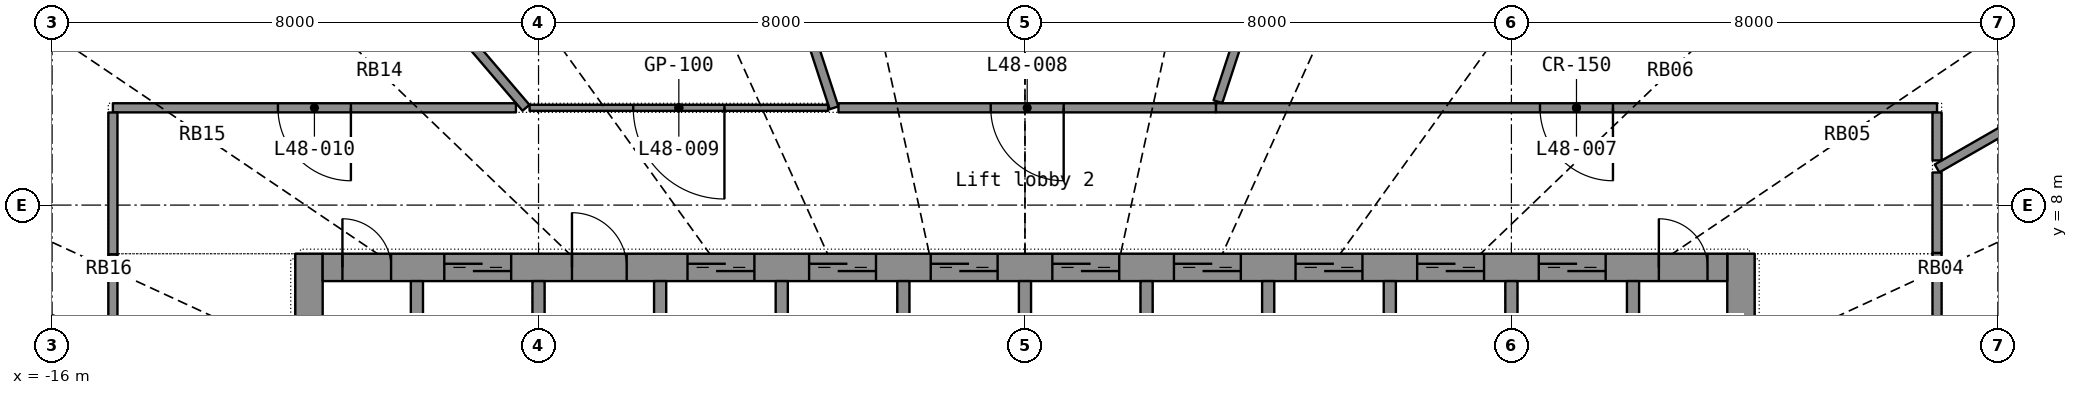
"""IFC4 building model, lengths in metres.
Left out: names, types, materials, properties, quantities, classifications, styles, units other than length and angle.
Written with IfcOpenShell. Run it as: python <this file> out.ifc"""

import sys

from ifc_helpers import new_model, si_unit, direction, frame, frame_2d, origin, place, context, subcontext, project, spatial, rectangle, extrude, element, fill, save


model = new_model("IFC4")
c1 = context("Model", 3, precision=1e-05, world=origin(), true_north=direction((0.0, 1.0)))
c2 = subcontext(c1, "Body", "Model", "MODEL_VIEW")
j1 = project(units=[si_unit("LENGTHUNIT", "METRE"), si_unit("PLANEANGLEUNIT", "RADIAN")], contexts=[c1])
p1 = place(None, origin())
s1 = spatial("IfcSite", under=j1, at=p1, CompositionType="ELEMENT")
p2 = place(p1, origin())
s2 = spatial("IfcBuilding", under=s1, at=p2, CompositionType="ELEMENT")
p3 = place(p2, frame((0.0, 0.0, 197.8)))
s3 = spatial("IfcBuildingStorey", under=s2, at=p3, CompositionType="ELEMENT", Elevation=197.8)
p4 = place(p3, frame((-11.775, -7.2, 0.0), z_axis=(0.0, 0.0, 1.0), x_axis=(0.0, 1.0, 0.0)))
e1 = element("IfcWall", 1, at=p4, inside=s3, PredefinedType="SHEAR", context=c2, shape_type="SweptSolid", body=[
    extrude(rectangle(XDim=14.4, YDim=0.45, at=frame_2d((7.2, 0.0))), origin(), (0.0, 0.0, 1.0), 3.3),
])
p5 = place(p4, frame((6.5, 0.0, 0.0)))
e2 = element("IfcOpeningElement", 2, at=p5, cuts=e1, PredefinedType="OPENING", context=c2, shape_type="SweptSolid", body=[
    extrude(rectangle(XDim=1.4, YDim=2.2, at=frame_2d((0.7, 1.1))), frame((0.0, 0.235, 0.0), z_axis=(0.0, -1.0, 0.0), x_axis=(1.0, 0.0, 0.0)), (0.0, 0.0, 1.0), 0.47),
])
p6 = place(p3, frame((11.775, -7.2, 0.0), z_axis=(0.0, 0.0, 1.0), x_axis=(0.0, 1.0, 0.0)))
e3 = element("IfcWall", 3, at=p6, inside=s3, PredefinedType="SHEAR", context=c2, shape_type="SweptSolid", body=[
    extrude(rectangle(XDim=14.4, YDim=0.45, at=frame_2d((7.2, 0.0))), origin(), (0.0, 0.0, 1.0), 3.3),
])
p7 = place(p6, frame((6.5, 0.0, 0.0)))
e4 = element("IfcOpeningElement", 4, at=p7, cuts=e3, PredefinedType="OPENING", context=c2, shape_type="SweptSolid", body=[
    extrude(rectangle(XDim=1.4, YDim=2.2, at=frame_2d((0.7, 1.1))), frame((0.0, 0.235, 0.0), z_axis=(0.0, -1.0, 0.0), x_axis=(1.0, 0.0, 0.0)), (0.0, 0.0, 1.0), 0.47),
])
p8 = place(p3, frame((-11.55, 6.975, 0.0), z_axis=(0.0, 0.0, 1.0), x_axis=(1.0, 0.0, 0.0)))
e5 = element("IfcWall", 5, at=p8, inside=s3, PredefinedType="SHEAR", context=c2, shape_type="SweptSolid", body=[
    extrude(rectangle(XDim=23.1, YDim=0.45, at=frame_2d((11.55, 0.0))), origin(), (0.0, 0.0, 1.0), 3.3),
])
p9 = place(p8, frame((2.0, 0.0, 0.0)))
e6 = element("IfcOpeningElement", 6, at=p9, cuts=e5, PredefinedType="OPENING", context=c2, shape_type="SweptSolid", body=[
    extrude(rectangle(XDim=1.1, YDim=2.2, at=frame_2d((0.55, 1.1))), frame((0.0, 0.235, 0.0), z_axis=(0.0, -1.0, 0.0), x_axis=(1.0, 0.0, 0.0)), (0.0, 0.0, 1.0), 0.47),
])
p10 = place(p8, frame((6.0, 0.0, 0.0)))
e7 = element("IfcOpeningElement", 7, at=p10, cuts=e5, PredefinedType="OPENING", context=c2, shape_type="SweptSolid", body=[
    extrude(rectangle(XDim=1.1, YDim=2.2, at=frame_2d((0.55, 1.1))), frame((0.0, 0.235, 0.0), z_axis=(0.0, -1.0, 0.0), x_axis=(1.0, 0.0, 0.0)), (0.0, 0.0, 1.0), 0.47),
])
p11 = place(p8, frame((8.0, 0.0, 0.0)))
e8 = element("IfcOpeningElement", 8, at=p11, cuts=e5, PredefinedType="OPENING", context=c2, shape_type="SweptSolid", body=[
    extrude(rectangle(XDim=1.1, YDim=2.2, at=frame_2d((0.55, 1.1))), frame((0.0, 0.235, 0.0), z_axis=(0.0, -1.0, 0.0), x_axis=(1.0, 0.0, 0.0)), (0.0, 0.0, 1.0), 0.47),
])
p12 = place(p8, frame((10.0, 0.0, 0.0)))
e9 = element("IfcOpeningElement", 9, at=p12, cuts=e5, PredefinedType="OPENING", context=c2, shape_type="SweptSolid", body=[
    extrude(rectangle(XDim=1.1, YDim=2.2, at=frame_2d((0.55, 1.1))), frame((0.0, 0.235, 0.0), z_axis=(0.0, -1.0, 0.0), x_axis=(1.0, 0.0, 0.0)), (0.0, 0.0, 1.0), 0.47),
])
p13 = place(p8, frame((12.0, 0.0, 0.0)))
e10 = element("IfcOpeningElement", 10, at=p13, cuts=e5, PredefinedType="OPENING", context=c2, shape_type="SweptSolid", body=[
    extrude(rectangle(XDim=1.1, YDim=2.2, at=frame_2d((0.55, 1.1))), frame((0.0, 0.235, 0.0), z_axis=(0.0, -1.0, 0.0), x_axis=(1.0, 0.0, 0.0)), (0.0, 0.0, 1.0), 0.47),
])
p14 = place(p8, frame((14.0, 0.0, 0.0)))
e11 = element("IfcOpeningElement", 11, at=p14, cuts=e5, PredefinedType="OPENING", context=c2, shape_type="SweptSolid", body=[
    extrude(rectangle(XDim=1.1, YDim=2.2, at=frame_2d((0.55, 1.1))), frame((0.0, 0.235, 0.0), z_axis=(0.0, -1.0, 0.0), x_axis=(1.0, 0.0, 0.0)), (0.0, 0.0, 1.0), 0.47),
])
p15 = place(p8, frame((16.0, 0.0, 0.0)))
e12 = element("IfcOpeningElement", 12, at=p15, cuts=e5, PredefinedType="OPENING", context=c2, shape_type="SweptSolid", body=[
    extrude(rectangle(XDim=1.1, YDim=2.2, at=frame_2d((0.55, 1.1))), frame((0.0, 0.235, 0.0), z_axis=(0.0, -1.0, 0.0), x_axis=(1.0, 0.0, 0.0)), (0.0, 0.0, 1.0), 0.47),
])
p16 = place(p8, frame((18.0, 0.0, 0.0)))
e13 = element("IfcOpeningElement", 13, at=p16, cuts=e5, PredefinedType="OPENING", context=c2, shape_type="SweptSolid", body=[
    extrude(rectangle(XDim=1.1, YDim=2.2, at=frame_2d((0.55, 1.1))), frame((0.0, 0.235, 0.0), z_axis=(0.0, -1.0, 0.0), x_axis=(1.0, 0.0, 0.0)), (0.0, 0.0, 1.0), 0.47),
])
p17 = place(p8, frame((20.0, 0.0, 0.0)))
e14 = element("IfcOpeningElement", 14, at=p17, cuts=e5, PredefinedType="OPENING", context=c2, shape_type="SweptSolid", body=[
    extrude(rectangle(XDim=1.1, YDim=2.2, at=frame_2d((0.55, 1.1))), frame((0.0, 0.235, 0.0), z_axis=(0.0, -1.0, 0.0), x_axis=(1.0, 0.0, 0.0)), (0.0, 0.0, 1.0), 0.47),
])
p18 = place(p8, frame((4.1, 0.0, 0.0)))
e15 = element("IfcOpeningElement", 15, at=p18, cuts=e5, PredefinedType="OPENING", context=c2, shape_type="SweptSolid", body=[
    extrude(rectangle(XDim=0.9, YDim=2.1, at=frame_2d((0.45, 1.05))), frame((0.0, 0.235, 0.0), z_axis=(0.0, -1.0, 0.0), x_axis=(1.0, 0.0, 0.0)), (0.0, 0.0, 1.0), 0.47),
])
p19 = place(p8, frame((0.325, 0.0, 0.0)))
e16 = element("IfcOpeningElement", 16, at=p19, cuts=e5, PredefinedType="OPENING", context=c2, shape_type="SweptSolid", body=[
    extrude(rectangle(XDim=0.8, YDim=2.05, at=frame_2d((0.4, 1.025))), frame((0.0, 0.235, 0.0), z_axis=(0.0, -1.0, 0.0), x_axis=(1.0, 0.0, 0.0)), (0.0, 0.0, 1.0), 0.47),
])
p20 = place(p8, frame((21.975, 0.0, 0.0)))
e17 = element("IfcOpeningElement", 17, at=p20, cuts=e5, PredefinedType="OPENING", context=c2, shape_type="SweptSolid", body=[
    extrude(rectangle(XDim=0.8, YDim=2.05, at=frame_2d((0.4, 1.025))), frame((0.0, 0.235, 0.0), z_axis=(0.0, -1.0, 0.0), x_axis=(1.0, 0.0, 0.0)), (0.0, 0.0, 1.0), 0.47),
])
for number, where, z_axis, x_axis in (
    (18, (-10.0, 3.9, 0.0), (0.0, 0.0, 1.0), (0.0, 1.0, 0.0)),
    (19, (-8.0, 3.9, 0.0), (0.0, 0.0, 1.0), (0.0, 1.0, 0.0)),
    (20, (-6.0, 3.9, 0.0), (0.0, 0.0, 1.0), (0.0, 1.0, 0.0)),
    (21, (-4.0, 3.9, 0.0), (0.0, 0.0, 1.0), (0.0, 1.0, 0.0)),
    (22, (-2.0, 3.9, 0.0), (0.0, 0.0, 1.0), (0.0, 1.0, 0.0)),
    (23, (0.0, 3.9, 0.0), (0.0, 0.0, 1.0), (0.0, 1.0, 0.0)),
    (24, (2.0, 3.9, 0.0), (0.0, 0.0, 1.0), (0.0, 1.0, 0.0)),
    (25, (4.0, 3.9, 0.0), (0.0, 0.0, 1.0), (0.0, 1.0, 0.0)),
    (26, (6.0, 3.9, 0.0), (0.0, 0.0, 1.0), (0.0, 1.0, 0.0)),
    (27, (8.0, 3.9, 0.0), (0.0, 0.0, 1.0), (0.0, 1.0, 0.0)),
    (28, (10.0, 3.9, 0.0), (0.0, 0.0, 1.0), (0.0, 1.0, 0.0)),
):
    element("IfcWall", number, at=place(p3, frame(where, z_axis=z_axis, x_axis=x_axis)), inside=s3, PredefinedType="SHEAR", context=c2, shape_type="SweptSolid", body=[
        extrude(rectangle(XDim=2.85, YDim=0.2, at=frame_2d((1.425, 0.0))), origin(), (0.0, 0.0, 1.0), 3.3),
    ])
p21 = place(p3, frame((15.0, 9.6, 0.0), z_axis=(0.0, 0.0, 1.0), x_axis=(-1.0, 0.0, 0.0)))
e29 = element("IfcWall", 29, at=p21, inside=s3, PredefinedType="PARTITIONING", context=c2, shape_type="SweptSolid", body=[
    extrude(rectangle(XDim=11.86, YDim=0.15, at=frame_2d((5.93, 0.0))), origin(), (0.0, 0.0, 1.0), 2.4),
])
p22 = place(p21, frame((5.33, 0.0, 0.0)))
e30 = element("IfcOpeningElement", 30, at=p22, cuts=e29, PredefinedType="OPENING", context=c2, shape_type="SweptSolid", body=[
    extrude(rectangle(XDim=1.2, YDim=2.2, at=frame_2d((0.6, 1.1))), frame((0.0, 0.085, 0.0), z_axis=(0.0, -1.0, 0.0), x_axis=(1.0, 0.0, 0.0)), (0.0, 0.0, 1.0), 0.17),
])
p23 = place(p3, frame((-5.853, 17.893, 0.0), z_axis=(0.0, 0.0, 1.0), x_axis=(0.310926014, -0.950434119, 0.0)))
e31 = element("IfcWall", 31, at=p23, inside=s3, PredefinedType="PARTITIONING", context=c2, shape_type="SweptSolid", body=[
    extrude(rectangle(XDim=8.725, YDim=0.15, at=frame_2d((4.363, 0.0))), origin(), (0.0, 0.0, 1.0), 2.4),
])
p24 = place(p3, frame((5.853, 17.893, 0.0), z_axis=(0.0, 0.0, 1.0), x_axis=(-0.310929285, -0.950433049, 0.0)))
e32 = element("IfcWall", 32, at=p24, inside=s3, PredefinedType="PARTITIONING", context=c2, shape_type="SweptSolid", body=[
    extrude(rectangle(XDim=8.62, YDim=0.15, at=frame_2d((4.31, 0.0))), origin(), (0.0, 0.0, 1.0), 2.4),
])
p25 = place(p3, frame((-12.975, 15.178, 0.0), z_axis=(0.0, 0.0, 1.0), x_axis=(0.649790761, -0.760113128, 0.0)))
e33 = element("IfcWall", 33, at=p25, inside=s3, PredefinedType="PARTITIONING", context=c2, shape_type="SweptSolid", body=[
    extrude(rectangle(XDim=7.338, YDim=0.15, at=frame_2d((3.669, 0.0))), origin(), (0.0, 0.0, 1.0), 2.4),
])
p26 = place(p3, frame((-8.371, 9.6, 0.0), z_axis=(0.0, 0.0, 1.0), x_axis=(-1.0, 0.0, 0.0)))
e34 = element("IfcWall", 34, at=p26, inside=s3, PredefinedType="PARTITIONING", context=c2, shape_type="SweptSolid", body=[
    extrude(rectangle(XDim=6.629, YDim=0.15, at=frame_2d((3.314, 0.0))), origin(), (0.0, 0.0, 1.0), 2.4),
])
p27 = place(p26, frame((2.714, 0.0, 0.0)))
e35 = element("IfcOpeningElement", 35, at=p27, cuts=e34, PredefinedType="OPENING", context=c2, shape_type="SweptSolid", body=[
    extrude(rectangle(XDim=1.2, YDim=2.2, at=frame_2d((0.6, 1.1))), frame((0.0, 0.085, 0.0), z_axis=(0.0, -1.0, 0.0), x_axis=(1.0, 0.0, 0.0)), (0.0, 0.0, 1.0), 0.17),
])
p28 = place(p3, frame((3.14, 9.6, 0.0), z_axis=(0.0, 0.0, 1.0), x_axis=(-1.0, 0.0, 0.0)))
e36 = element("IfcWall", 36, at=p28, inside=s3, PredefinedType="PARTITIONING", context=c2, shape_type="SweptSolid", body=[
    extrude(rectangle(XDim=6.208, YDim=0.15, at=frame_2d((3.104, 0.0))), origin(), (0.0, 0.0, 1.0), 2.4),
])
p29 = place(p28, frame((2.504, 0.0, 0.0)))
e37 = element("IfcOpeningElement", 37, at=p29, cuts=e36, PredefinedType="OPENING", context=c2, shape_type="SweptSolid", body=[
    extrude(rectangle(XDim=1.2, YDim=2.2, at=frame_2d((0.6, 1.1))), frame((0.0, 0.085, 0.0), z_axis=(0.0, -1.0, 0.0), x_axis=(1.0, 0.0, 0.0)), (0.0, 0.0, 1.0), 0.17),
])
p30 = place(p3, frame((-20.515, 7.836, 0.0), z_axis=(0.0, 0.0, 1.0), x_axis=(0.934186062, -0.356786213, 0.0)))
e38 = element("IfcWall", 38, at=p30, inside=s3, PredefinedType="PARTITIONING", context=c2, shape_type="SweptSolid", body=[
    extrude(rectangle(XDim=5.904, YDim=0.15, at=frame_2d((2.952, 0.0))), origin(), (0.0, 0.0, 1.0), 2.4),
])
p31 = place(p3, frame((15.0, 1.8, 0.0), z_axis=(0.0, 0.0, 1.0), x_axis=(0.0, 1.0, 0.0)))
e39 = element("IfcWall", 39, at=p31, inside=s3, PredefinedType="PARTITIONING", context=c2, shape_type="SweptSolid", body=[
    extrude(rectangle(XDim=5.412, YDim=0.15, at=frame_2d((2.706, 0.0))), origin(), (0.0, 0.0, 1.0), 2.4),
])
p32 = place(p31, frame((2.106, 0.0, 0.0)))
e40 = element("IfcOpeningElement", 40, at=p32, cuts=e39, PredefinedType="OPENING", context=c2, shape_type="SweptSolid", body=[
    extrude(rectangle(XDim=1.2, YDim=2.2, at=frame_2d((0.6, 1.1))), frame((0.0, 0.085, 0.0), z_axis=(0.0, -1.0, 0.0), x_axis=(1.0, 0.0, 0.0)), (0.0, 0.0, 1.0), 0.17),
])
p33 = place(p3, frame((-3.238, 9.6, 0.0), z_axis=(0.0, 0.0, 1.0), x_axis=(-1.0, 0.0, 0.0)))
e41 = element("IfcWall", 41, at=p33, inside=s3, PredefinedType="PARTITIONING", context=c2, shape_type="SweptSolid", body=[
    extrude(rectangle(XDim=4.91, YDim=0.1, at=frame_2d((2.455, 0.0))), origin(), (0.0, 0.0, 1.0), 2.4),
])
p34 = place(p33, frame((1.705, 0.0, 0.0)))
e42 = element("IfcOpeningElement", 42, at=p34, cuts=e41, PredefinedType="OPENING", context=c2, shape_type="SweptSolid", body=[
    extrude(rectangle(XDim=1.5, YDim=2.4, at=frame_2d((0.75, 1.2))), frame((0.0, 0.06, 0.0), z_axis=(0.0, -1.0, 0.0), x_axis=(1.0, 0.0, 0.0)), (0.0, 0.0, 1.0), 0.12),
])
p35 = place(p3, frame((18.537, 10.632, 0.0), z_axis=(0.0, 0.0, 1.0), x_axis=(-0.867438786, -0.49754392, 0.0)))
e43 = element("IfcWall", 43, at=p35, inside=s3, PredefinedType="PARTITIONING", context=c2, shape_type="SweptSolid", body=[
    extrude(rectangle(XDim=4.078, YDim=0.15, at=frame_2d((2.039, 0.0))), origin(), (0.0, 0.0, 1.0), 2.4),
])
p36 = place(p3, frame((-15.0, 9.523, 0.0), z_axis=(0.0, 0.0, 1.0), x_axis=(0.0, -1.0, 0.0)))
e44 = element("IfcWall", 44, at=p36, inside=s3, PredefinedType="PARTITIONING", context=c2, shape_type="SweptSolid", body=[
    extrude(rectangle(XDim=2.335, YDim=0.15, at=frame_2d((1.167, 0.0))), origin(), (0.0, 0.0, 1.0), 2.4),
])
p37 = place(p3, frame((-15.0, 7.187, 0.0), z_axis=(0.0, 0.0, 1.0), x_axis=(0.0, -1.0, 0.0)))
e45 = element("IfcWall", 45, at=p37, inside=s3, PredefinedType="PARTITIONING", context=c2, shape_type="SweptSolid", body=[
    extrude(rectangle(XDim=1.347, YDim=0.15, at=frame_2d((0.673, 0.0))), origin(), (0.0, 0.0, 1.0), 2.4),
])
p38 = place(p3, frame((15.0, 7.213, 0.0), z_axis=(0.0, 0.0, 1.0), x_axis=(0.0, 1.0, 0.0)))
e46 = element("IfcWall", 46, at=p38, inside=s3, PredefinedType="PARTITIONING", context=c2, shape_type="SweptSolid", body=[
    extrude(rectangle(XDim=1.323, YDim=0.15, at=frame_2d((0.662, 0.0))), origin(), (0.0, 0.0, 1.0), 2.4),
])
p39 = place(p3, frame((15.0, 8.735, 0.0), z_axis=(0.0, 0.0, 1.0), x_axis=(0.0, 1.0, 0.0)))
e47 = element("IfcWall", 47, at=p39, inside=s3, PredefinedType="PARTITIONING", context=c2, shape_type="SweptSolid", body=[
    extrude(rectangle(XDim=0.788, YDim=0.15, at=frame_2d((0.394, 0.0))), origin(), (0.0, 0.0, 1.0), 2.4),
])
p40 = place(p9, origin())
e48 = element("IfcDoor", 48, at=p40, inside=s3, OperationType="DOUBLE_DOOR_SLIDING", PredefinedType="DOOR", context=c2, shape_type="SweptSolid", body=[
    extrude(rectangle(XDim=1.1, YDim=2.2, at=frame_2d((0.55, 1.1))), frame((0.0, 0.025, 0.0), z_axis=(0.0, -1.0, 0.0), x_axis=(1.0, 0.0, 0.0)), (0.0, 0.0, 1.0), 0.05),
])
fill(e6, e48)
p41 = place(p10, origin())
e49 = element("IfcDoor", 49, at=p41, inside=s3, OperationType="DOUBLE_DOOR_SLIDING", PredefinedType="DOOR", context=c2, shape_type="SweptSolid", body=[
    extrude(rectangle(XDim=1.1, YDim=2.2, at=frame_2d((0.55, 1.1))), frame((0.0, 0.025, 0.0), z_axis=(0.0, -1.0, 0.0), x_axis=(1.0, 0.0, 0.0)), (0.0, 0.0, 1.0), 0.05),
])
fill(e7, e49)
p42 = place(p11, origin())
e50 = element("IfcDoor", 50, at=p42, inside=s3, OperationType="DOUBLE_DOOR_SLIDING", PredefinedType="DOOR", context=c2, shape_type="SweptSolid", body=[
    extrude(rectangle(XDim=1.1, YDim=2.2, at=frame_2d((0.55, 1.1))), frame((0.0, 0.025, 0.0), z_axis=(0.0, -1.0, 0.0), x_axis=(1.0, 0.0, 0.0)), (0.0, 0.0, 1.0), 0.05),
])
fill(e8, e50)
p43 = place(p12, origin())
e51 = element("IfcDoor", 51, at=p43, inside=s3, OperationType="DOUBLE_DOOR_SLIDING", PredefinedType="DOOR", context=c2, shape_type="SweptSolid", body=[
    extrude(rectangle(XDim=1.1, YDim=2.2, at=frame_2d((0.55, 1.1))), frame((0.0, 0.025, 0.0), z_axis=(0.0, -1.0, 0.0), x_axis=(1.0, 0.0, 0.0)), (0.0, 0.0, 1.0), 0.05),
])
fill(e9, e51)
p44 = place(p13, origin())
e52 = element("IfcDoor", 52, at=p44, inside=s3, OperationType="DOUBLE_DOOR_SLIDING", PredefinedType="DOOR", context=c2, shape_type="SweptSolid", body=[
    extrude(rectangle(XDim=1.1, YDim=2.2, at=frame_2d((0.55, 1.1))), frame((0.0, 0.025, 0.0), z_axis=(0.0, -1.0, 0.0), x_axis=(1.0, 0.0, 0.0)), (0.0, 0.0, 1.0), 0.05),
])
fill(e10, e52)
p45 = place(p14, origin())
e53 = element("IfcDoor", 53, at=p45, inside=s3, OperationType="DOUBLE_DOOR_SLIDING", PredefinedType="DOOR", context=c2, shape_type="SweptSolid", body=[
    extrude(rectangle(XDim=1.1, YDim=2.2, at=frame_2d((0.55, 1.1))), frame((0.0, 0.025, 0.0), z_axis=(0.0, -1.0, 0.0), x_axis=(1.0, 0.0, 0.0)), (0.0, 0.0, 1.0), 0.05),
])
fill(e11, e53)
p46 = place(p15, origin())
e54 = element("IfcDoor", 54, at=p46, inside=s3, OperationType="DOUBLE_DOOR_SLIDING", PredefinedType="DOOR", context=c2, shape_type="SweptSolid", body=[
    extrude(rectangle(XDim=1.1, YDim=2.2, at=frame_2d((0.55, 1.1))), frame((0.0, 0.025, 0.0), z_axis=(0.0, -1.0, 0.0), x_axis=(1.0, 0.0, 0.0)), (0.0, 0.0, 1.0), 0.05),
])
fill(e12, e54)
p47 = place(p16, origin())
e55 = element("IfcDoor", 55, at=p47, inside=s3, OperationType="DOUBLE_DOOR_SLIDING", PredefinedType="DOOR", context=c2, shape_type="SweptSolid", body=[
    extrude(rectangle(XDim=1.1, YDim=2.2, at=frame_2d((0.55, 1.1))), frame((0.0, 0.025, 0.0), z_axis=(0.0, -1.0, 0.0), x_axis=(1.0, 0.0, 0.0)), (0.0, 0.0, 1.0), 0.05),
])
fill(e13, e55)
p48 = place(p17, origin())
e56 = element("IfcDoor", 56, at=p48, inside=s3, OperationType="DOUBLE_DOOR_SLIDING", PredefinedType="DOOR", context=c2, shape_type="SweptSolid", body=[
    extrude(rectangle(XDim=1.1, YDim=2.2, at=frame_2d((0.55, 1.1))), frame((0.0, 0.025, 0.0), z_axis=(0.0, -1.0, 0.0), x_axis=(1.0, 0.0, 0.0)), (0.0, 0.0, 1.0), 0.05),
])
fill(e14, e56)
p49 = place(p18, origin())
e57 = element("IfcDoor", 57, at=p49, inside=s3, OperationType="SINGLE_SWING_LEFT", PredefinedType="DOOR", context=c2, shape_type="SweptSolid", body=[
    extrude(rectangle(XDim=0.9, YDim=2.1, at=frame_2d((0.45, 1.05))), frame((0.0, 0.025, 0.0), z_axis=(0.0, -1.0, 0.0), x_axis=(1.0, 0.0, 0.0)), (0.0, 0.0, 1.0), 0.05),
])
fill(e15, e57)
p50 = place(p19, origin())
e58 = element("IfcDoor", 58, at=p50, inside=s3, OperationType="SINGLE_SWING_LEFT", PredefinedType="DOOR", context=c2, shape_type="SweptSolid", body=[
    extrude(rectangle(XDim=0.8, YDim=2.05, at=frame_2d((0.4, 1.025))), frame((0.0, 0.025, 0.0), z_axis=(0.0, -1.0, 0.0), x_axis=(1.0, 0.0, 0.0)), (0.0, 0.0, 1.0), 0.05),
])
fill(e16, e58)
p51 = place(p20, origin())
e59 = element("IfcDoor", 59, at=p51, inside=s3, OperationType="SINGLE_SWING_LEFT", PredefinedType="DOOR", context=c2, shape_type="SweptSolid", body=[
    extrude(rectangle(XDim=0.8, YDim=2.05, at=frame_2d((0.4, 1.025))), frame((0.0, 0.025, 0.0), z_axis=(0.0, -1.0, 0.0), x_axis=(1.0, 0.0, 0.0)), (0.0, 0.0, 1.0), 0.05),
])
fill(e17, e59)
p52 = place(p22, origin())
e60 = element("IfcDoor", 60, at=p52, inside=s3, OperationType="DOUBLE_DOOR_SINGLE_SWING", PredefinedType="DOOR", context=c2, shape_type="SweptSolid", body=[
    extrude(rectangle(XDim=1.2, YDim=2.2, at=frame_2d((0.6, 1.1))), frame((0.0, 0.025, 0.0), z_axis=(0.0, -1.0, 0.0), x_axis=(1.0, 0.0, 0.0)), (0.0, 0.0, 1.0), 0.05),
])
fill(e30, e60)
p53 = place(p29, origin())
e61 = element("IfcDoor", 61, at=p53, inside=s3, OperationType="DOUBLE_DOOR_SINGLE_SWING", PredefinedType="DOOR", context=c2, shape_type="SweptSolid", body=[
    extrude(rectangle(XDim=1.2, YDim=2.2, at=frame_2d((0.6, 1.1))), frame((0.0, 0.025, 0.0), z_axis=(0.0, -1.0, 0.0), x_axis=(1.0, 0.0, 0.0)), (0.0, 0.0, 1.0), 0.05),
])
fill(e37, e61)
p54 = place(p34, origin())
e62 = element("IfcDoor", 62, at=p54, inside=s3, OperationType="DOUBLE_DOOR_SINGLE_SWING", PredefinedType="DOOR", context=c2, shape_type="SweptSolid", body=[
    extrude(rectangle(XDim=1.5, YDim=2.4, at=frame_2d((0.75, 1.2))), frame((0.0, 0.025, 0.0), z_axis=(0.0, -1.0, 0.0), x_axis=(1.0, 0.0, 0.0)), (0.0, 0.0, 1.0), 0.05),
])
fill(e42, e62)
p55 = place(p27, origin())
e63 = element("IfcDoor", 63, at=p55, inside=s3, OperationType="DOUBLE_DOOR_SINGLE_SWING", PredefinedType="DOOR", context=c2, shape_type="SweptSolid", body=[
    extrude(rectangle(XDim=1.2, YDim=2.2, at=frame_2d((0.6, 1.1))), frame((0.0, 0.025, 0.0), z_axis=(0.0, -1.0, 0.0), x_axis=(1.0, 0.0, 0.0)), (0.0, 0.0, 1.0), 0.05),
])
fill(e35, e63)
save(model, sys.argv[1])
